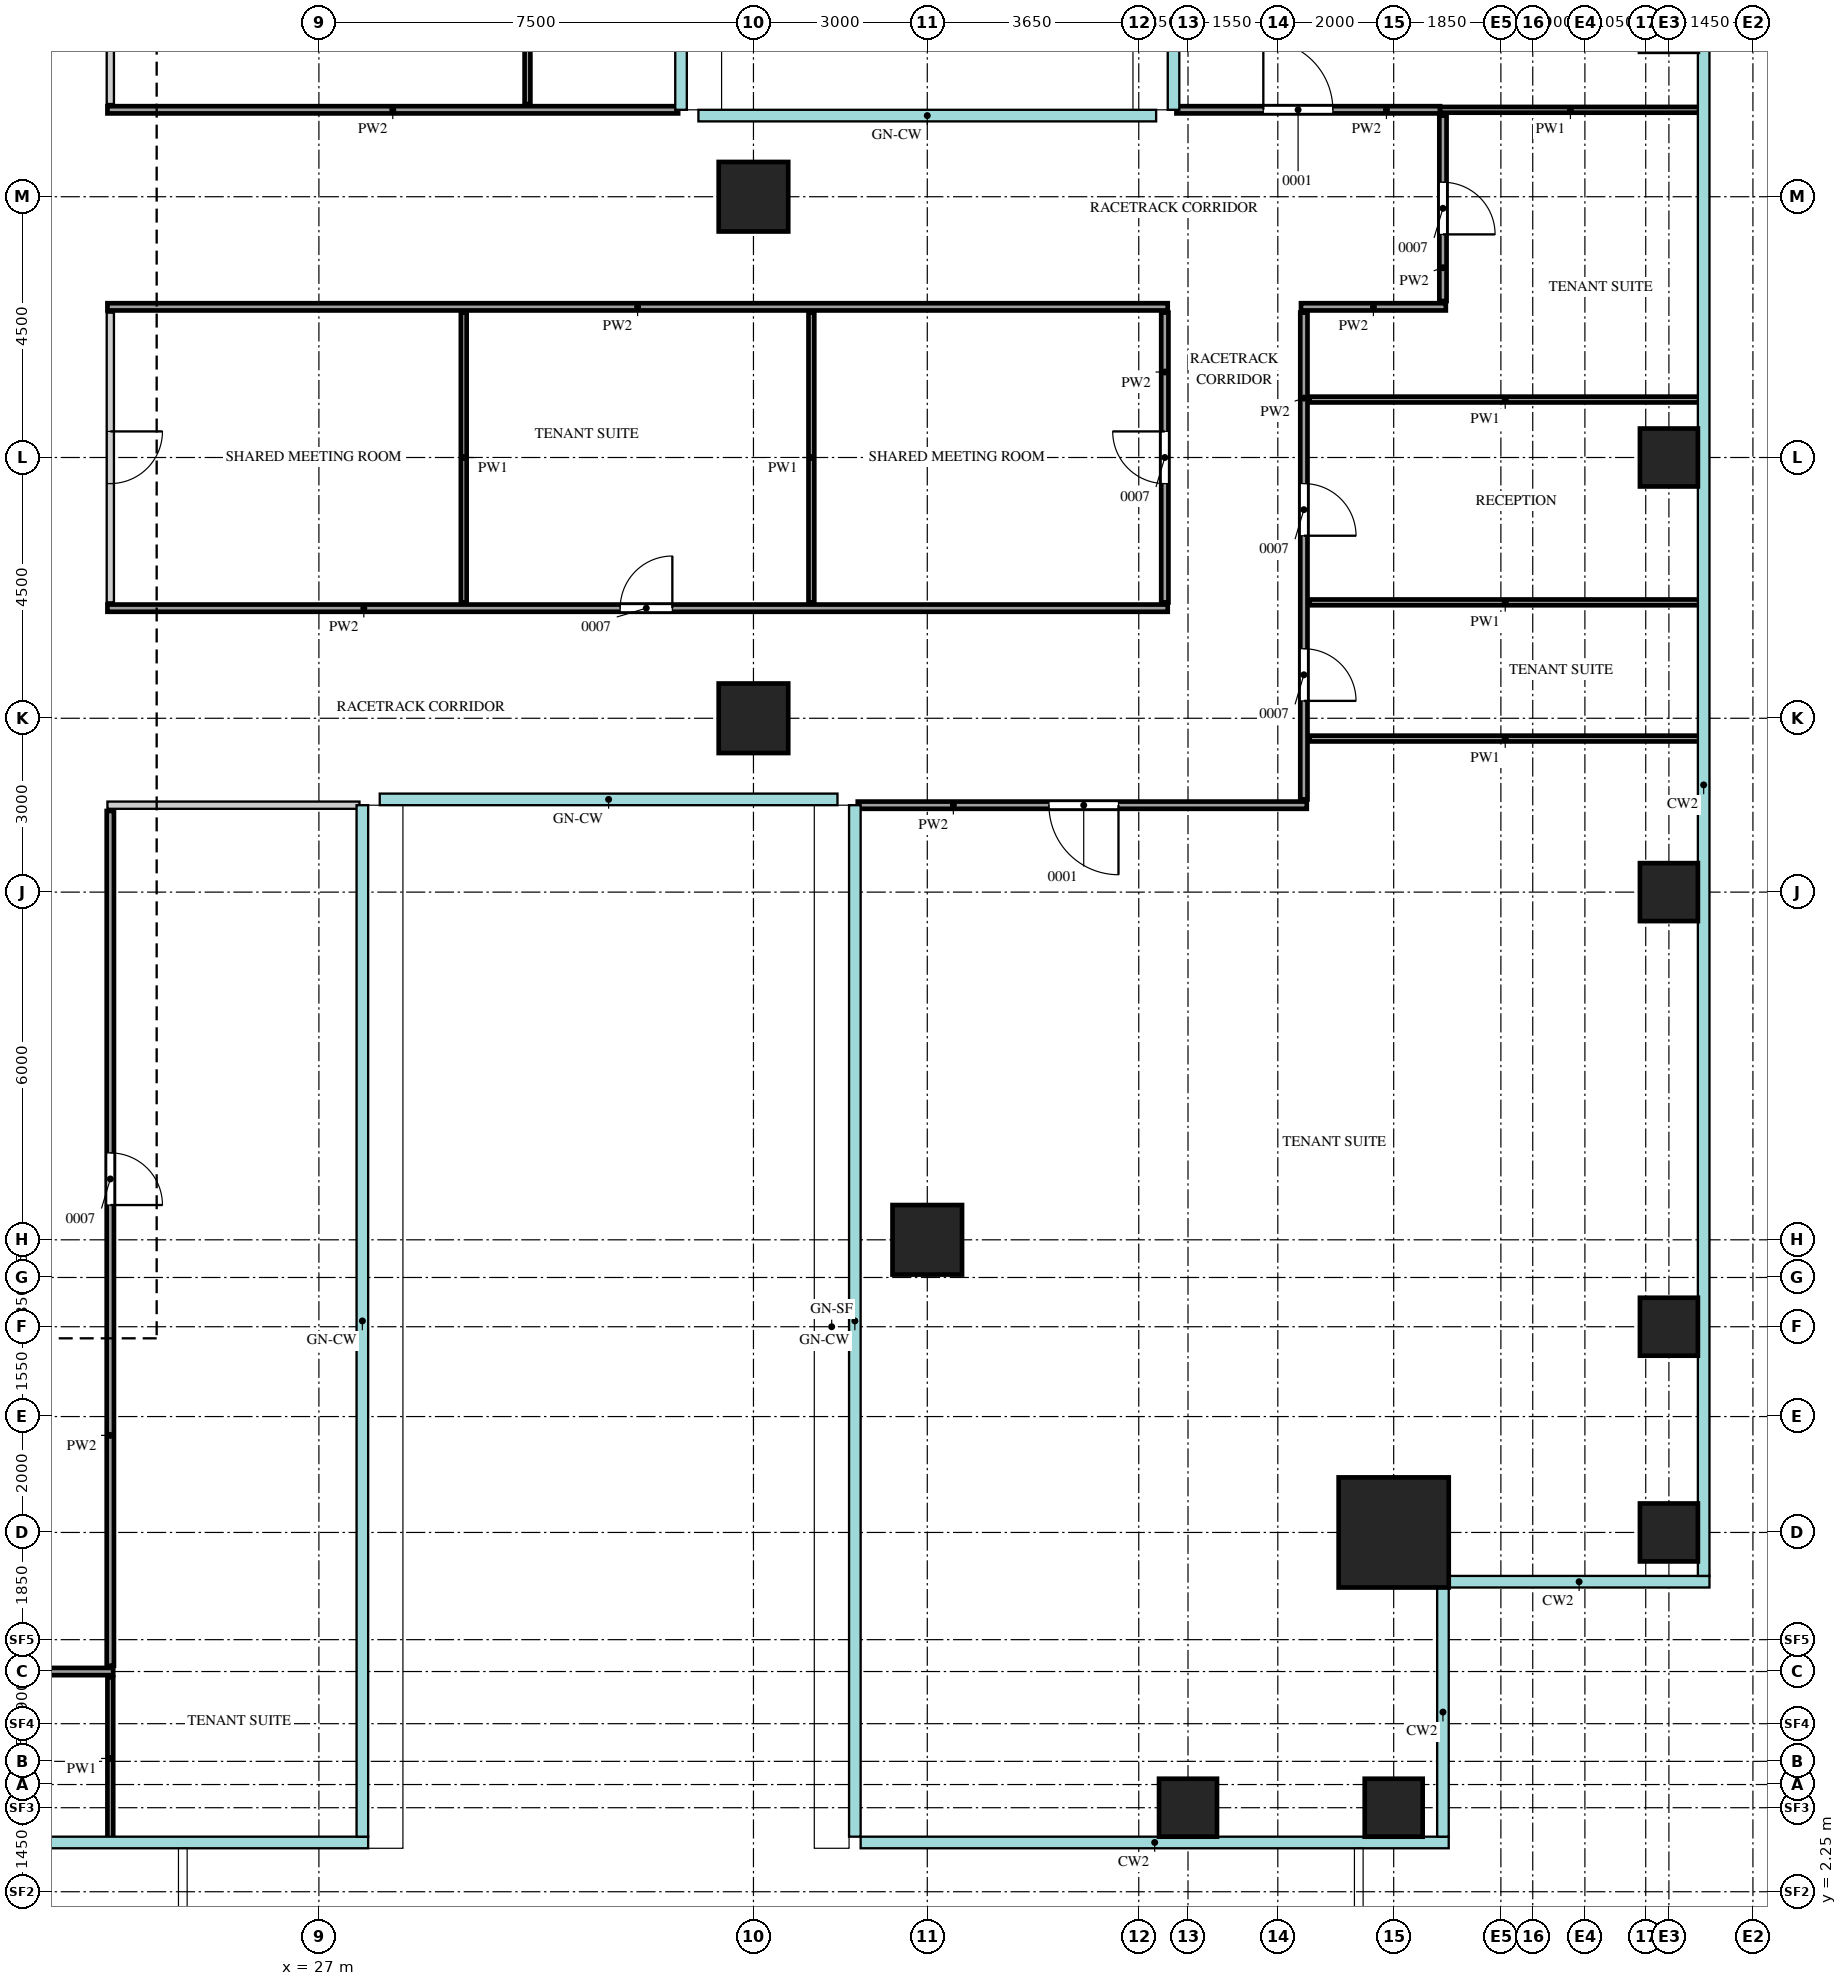
"""IFC4 building model, lengths in metres.
Left out: names, types, materials, properties, quantities, classifications, styles, units other than length and angle.
Written with IfcOpenShell. Run it as: python <this file> out.ifc"""

import sys

from ifc_helpers import new_model, si_unit, direction, frame, frame_2d, origin, origin_2d, place, context, subcontext, project, spatial, rectangle, extrude, source, transform, mapped, element, fill, save


model = new_model("IFC4")
c1 = context("Model", 3, precision=1e-05, world=origin(), true_north=direction((0.0, 1.0)))
c2 = subcontext(c1, "Body", "Model", "MODEL_VIEW")
j1 = project(units=[si_unit("LENGTHUNIT", "METRE"), si_unit("PLANEANGLEUNIT", "RADIAN")], contexts=[c1])
p1 = place(None, origin())
s1 = spatial("IfcSite", under=j1, at=p1, CompositionType="ELEMENT")
p2 = place(p1, origin())
s2 = spatial("IfcBuilding", under=s1, at=p2, CompositionType="ELEMENT")
p3 = place(p2, frame((0.0, 0.0, 180.7)))
s3 = spatial("IfcBuildingStorey", under=s2, at=p3, CompositionType="ELEMENT", Elevation=180.7)
m1 = source(origin(), c2, "Body", "SweptSolid", [
    extrude(rectangle(XDim=1.9, YDim=1.9, at=origin_2d()), origin(), (0.0, 0.0, 1.0), 4.0),
])
p4 = place(p3, frame((45.55, 8.45, 0.0), z_axis=(0.0, 0.0, 1.0), x_axis=(1.0, 0.0, 0.0)))
e1 = element("IfcColumn", 1, at=p4, inside=s3, PredefinedType="COLUMN", context=c2, shape_type="MappedRepresentation", body=[
    mapped(m1, transform((0.0, 0.0, 0.0))),
])
m2 = source(origin(), c2, "Body", "SweptSolid", [
    extrude(rectangle(XDim=1.0, YDim=1.0, at=origin_2d()), origin(), (0.0, 0.0, 1.0), 3.75),
])
for number, where, z_axis, x_axis in (
    (2, (42.0, 3.7, 0.0), (0.0, 0.0, 1.0), (1.0, 0.0, 0.0)),
    (3, (45.55, 3.7, 0.0), (0.0, 0.0, 1.0), (1.0, 0.0, 0.0)),
    (4, (50.3, 8.45, 0.0), (0.0, 0.0, 1.0), (1.0, 0.0, 0.0)),
    (5, (50.3, 12.0, 0.0), (0.0, 0.0, 1.0), (1.0, 0.0, 0.0)),
    (6, (50.3, 19.5, 0.0), (0.0, 0.0, 1.0), (1.0, 0.0, 0.0)),
    (7, (50.3, 27.0, 0.0), (0.0, 0.0, 1.0), (1.0, 0.0, 0.0)),
):
    element("IfcColumn", number, at=place(p3, frame(where, z_axis=z_axis, x_axis=x_axis)), inside=s3, PredefinedType="COLUMN", context=c2, shape_type="MappedRepresentation", body=[
        mapped(m2, transform((0.0, 0.0, 0.0))),
    ])
m3 = source(origin(), c2, "Body", "SweptSolid", [
    extrude(rectangle(XDim=1.2, YDim=1.2, at=origin_2d()), origin(), (0.0, 0.0, 1.0), 3.75),
])
for number, where, z_axis, x_axis in (
    (8, (37.5, 13.5, 0.0), (0.0, 0.0, 1.0), (1.0, 0.0, 0.0)),
    (9, (34.5, 22.5, 0.0), (0.0, 0.0, 1.0), (1.0, 0.0, 0.0)),
    (10, (34.5, 31.5, 0.0), (0.0, 0.0, 1.0), (1.0, 0.0, 0.0)),
):
    element("IfcColumn", number, at=place(p3, frame(where, z_axis=z_axis, x_axis=x_axis)), inside=s3, PredefinedType="COLUMN", context=c2, shape_type="MappedRepresentation", body=[
        mapped(m3, transform((0.0, 0.0, 0.0))),
    ])
m4 = source(origin(), c2, "Body", "SweptSolid", [
    extrude(rectangle(XDim=2.8, YDim=0.1, at=frame_2d((1.4, 0.0))), origin(), (0.0, 0.0, 1.0), 3.8),
])
p5 = place(p3, frame((23.4, 3.15, 0.0), z_axis=(0.0, 0.0, 1.0), x_axis=(0.0, 1.0, 0.0)))
e11 = element("IfcWall", 11, at=p5, inside=s3, PredefinedType="PARTITIONING", context=c2, shape_type="MappedRepresentation", body=[
    mapped(m4, transform((0.0, 0.0, 0.0))),
])
m5 = source(origin(), c2, "Body", "SweptSolid", [
    extrude(rectangle(XDim=15.8, YDim=0.125, at=frame_2d((7.9, 0.0))), origin(), (0.0, 0.0, 1.0), 3.8),
])
p6 = place(p3, frame((7.65, 6.05, 0.0), z_axis=(0.0, 0.0, 1.0), x_axis=(1.0, 0.0, 0.0)))
e12 = element("IfcWall", 12, at=p6, inside=s3, PredefinedType="PARTITIONING", context=c2, shape_type="MappedRepresentation", body=[
    mapped(m5, transform((0.0, 0.0, 0.0))),
])
m6 = source(origin(), c2, "Body", "SweptSolid", [
    extrude(rectangle(XDim=0.9, YDim=2.1, at=frame_2d((0.45, 1.05))), frame((0.0, 0.073, 0.0), z_axis=(0.0, -1.0, 0.0), x_axis=(1.0, 0.0, 0.0)), (0.0, 0.0, 1.0), 0.145),
])
p7 = place(p6, frame((1.8, 0.0, 0.0)))
e13 = element("IfcOpeningElement", 13, at=p7, cuts=e12, PredefinedType="OPENING", context=c2, shape_type="MappedRepresentation", body=[
    mapped(m6, transform((0.0, 0.0, 0.0))),
])
p8 = place(p6, frame((8.85, 0.0, 0.0)))
e14 = element("IfcOpeningElement", 14, at=p8, cuts=e12, PredefinedType="OPENING", context=c2, shape_type="MappedRepresentation", body=[
    mapped(m6, transform((0.0, 0.0, 0.0))),
])
m7 = source(origin(), c2, "Body", "SweptSolid", [
    extrude(rectangle(XDim=14.75, YDim=0.125, at=frame_2d((7.375, 0.0))), origin(), (0.0, 0.0, 1.0), 3.8),
])
p9 = place(p3, frame((23.4, 6.15, 0.0), z_axis=(0.0, 0.0, 1.0), x_axis=(0.0, 1.0, 0.0)))
e15 = element("IfcWall", 15, at=p9, inside=s3, PredefinedType="PARTITIONING", context=c2, shape_type="MappedRepresentation", body=[
    mapped(m7, transform((0.0, 0.0, 0.0))),
])
p10 = place(p9, frame((7.95, 0.0, 0.0)))
e16 = element("IfcOpeningElement", 16, at=p10, cuts=e15, PredefinedType="OPENING", context=c2, shape_type="MappedRepresentation", body=[
    mapped(m6, transform((0.0, 0.0, 0.0))),
])
m8 = source(origin(), c2, "Body", "SweptSolid", [
    extrude(rectangle(XDim=4.35, YDim=0.125, at=frame_2d((2.175, 0.0))), origin(), (0.0, 0.0, 1.0), 3.8),
])
p11 = place(p3, frame((23.35, 21.0, 0.0), z_axis=(0.0, 0.0, 1.0), x_axis=(1.0, 0.0, 0.0)))
e17 = element("IfcWall", 17, at=p11, inside=s3, PredefinedType="PARTITIONING", context=c2, shape_type="MappedRepresentation", body=[
    mapped(m8, transform((0.0, 0.0, 0.0))),
])
m9 = source(origin(), c2, "Body", "SweptSolid", [
    extrude(rectangle(XDim=7.75, YDim=0.125, at=frame_2d((3.875, 0.0))), origin(), (0.0, 0.0, 1.0), 3.8),
])
p12 = place(p3, frame((36.3, 21.0, 0.0), z_axis=(0.0, 0.0, 1.0), x_axis=(1.0, 0.0, 0.0)))
e18 = element("IfcWall", 18, at=p12, inside=s3, PredefinedType="PARTITIONING", context=c2, shape_type="MappedRepresentation", body=[
    mapped(m9, transform((0.0, 0.0, 0.0))),
])
m10 = source(origin(), c2, "Body", "SweptSolid", [
    extrude(rectangle(XDim=1.2, YDim=2.1, at=frame_2d((0.6, 1.05))), frame((0.0, 0.073, 0.0), z_axis=(0.0, -1.0, 0.0), x_axis=(1.0, 0.0, 0.0)), (0.0, 0.0, 1.0), 0.145),
])
p13 = place(p12, frame((3.3, 0.0, 0.0)))
e19 = element("IfcOpeningElement", 19, at=p13, cuts=e18, PredefinedType="OPENING", context=c2, shape_type="MappedRepresentation", body=[
    mapped(m10, transform((0.0, 0.0, 0.0))),
])
m11 = source(origin(), c2, "Body", "SweptSolid", [
    extrude(rectangle(XDim=8.4, YDim=0.125, at=frame_2d((4.2, 0.0))), origin(), (0.0, 0.0, 1.0), 3.8),
])
p14 = place(p3, frame((44.0, 21.1, 0.0), z_axis=(0.0, 0.0, 1.0), x_axis=(0.0, 1.0, 0.0)))
e20 = element("IfcWall", 20, at=p14, inside=s3, PredefinedType="PARTITIONING", context=c2, shape_type="MappedRepresentation", body=[
    mapped(m11, transform((0.0, 0.0, 0.0))),
])
p15 = place(p14, frame((1.7, 0.0, 0.0)))
e21 = element("IfcOpeningElement", 21, at=p15, cuts=e20, PredefinedType="OPENING", context=c2, shape_type="MappedRepresentation", body=[
    mapped(m6, transform((0.0, 0.0, 0.0))),
])
p16 = place(p14, frame((4.55, 0.0, 0.0)))
e22 = element("IfcOpeningElement", 22, at=p16, cuts=e20, PredefinedType="OPENING", context=c2, shape_type="MappedRepresentation", body=[
    mapped(m6, transform((0.0, 0.0, 0.0))),
])
m12 = source(origin(), c2, "Body", "SweptSolid", [
    extrude(rectangle(XDim=6.75, YDim=0.1, at=frame_2d((3.375, 0.0))), origin(), (0.0, 0.0, 1.0), 3.8),
])
p17 = place(p3, frame((44.1, 22.15, 0.0), z_axis=(0.0, 0.0, 1.0), x_axis=(1.0, 0.0, 0.0)))
e23 = element("IfcWall", 23, at=p17, inside=s3, PredefinedType="PARTITIONING", context=c2, shape_type="MappedRepresentation", body=[
    mapped(m12, transform((0.0, 0.0, 0.0))),
])
m13 = source(origin(), c2, "Body", "SweptSolid", [
    extrude(rectangle(XDim=18.3, YDim=0.125, at=frame_2d((9.15, 0.0))), origin(), (0.0, 0.0, 1.0), 3.8),
])
p18 = place(p3, frame((23.35, 24.4, 0.0), z_axis=(0.0, 0.0, 1.0), x_axis=(1.0, 0.0, 0.0)))
e24 = element("IfcWall", 24, at=p18, inside=s3, PredefinedType="PARTITIONING", context=c2, shape_type="MappedRepresentation", body=[
    mapped(m13, transform((0.0, 0.0, 0.0))),
])
p19 = place(p18, frame((8.85, 0.0, 0.0)))
e25 = element("IfcOpeningElement", 25, at=p19, cuts=e24, PredefinedType="OPENING", context=c2, shape_type="MappedRepresentation", body=[
    mapped(m6, transform((0.0, 0.0, 0.0))),
])
m14 = source(origin(), c2, "Body", "SweptSolid", [
    extrude(rectangle(XDim=5.0, YDim=0.125, at=frame_2d((2.5, 0.0))), origin(), (0.0, 0.0, 1.0), 3.8),
])
p20 = place(p3, frame((23.4, 24.5, 0.0), z_axis=(0.0, 0.0, 1.0), x_axis=(0.0, 1.0, 0.0)))
e26 = element("IfcWall", 26, at=p20, inside=s3, PredefinedType="PARTITIONING", context=c2, shape_type="MappedRepresentation", body=[
    mapped(m14, transform((0.0, 0.0, 0.0))),
])
p21 = place(p20, frame((2.05, 0.0, 0.0)))
e27 = element("IfcOpeningElement", 27, at=p21, cuts=e26, PredefinedType="OPENING", context=c2, shape_type="MappedRepresentation", body=[
    mapped(m6, transform((0.0, 0.0, 0.0))),
])
m15 = source(origin(), c2, "Body", "SweptSolid", [
    extrude(rectangle(XDim=5.0, YDim=0.1, at=frame_2d((2.5, 0.0))), origin(), (0.0, 0.0, 1.0), 3.8),
])
for number, where, z_axis, x_axis in (
    (28, (29.5, 24.5, 0.0), (0.0, 0.0, 1.0), (0.0, 1.0, 0.0)),
    (29, (35.5, 24.5, 0.0), (0.0, 0.0, 1.0), (0.0, 1.0, 0.0)),
):
    element("IfcWall", number, at=place(p3, frame(where, z_axis=z_axis, x_axis=x_axis)), inside=s3, PredefinedType="PARTITIONING", context=c2, shape_type="MappedRepresentation", body=[
        mapped(m15, transform((0.0, 0.0, 0.0))),
    ])
p22 = place(p3, frame((41.6, 24.5, 0.0), z_axis=(0.0, 0.0, 1.0), x_axis=(0.0, 1.0, 0.0)))
e30 = element("IfcWall", 30, at=p22, inside=s3, PredefinedType="PARTITIONING", context=c2, shape_type="MappedRepresentation", body=[
    mapped(m14, transform((0.0, 0.0, 0.0))),
])
p23 = place(p22, frame((2.05, 0.0, 0.0)))
e31 = element("IfcOpeningElement", 31, at=p23, cuts=e30, PredefinedType="OPENING", context=c2, shape_type="MappedRepresentation", body=[
    mapped(m6, transform((0.0, 0.0, 0.0))),
])
for number, where, z_axis, x_axis in (
    (32, (44.1, 24.5, 0.0), (0.0, 0.0, 1.0), (1.0, 0.0, 0.0)),
    (33, (44.1, 28.0, 0.0), (0.0, 0.0, 1.0), (1.0, 0.0, 0.0)),
):
    element("IfcWall", number, at=place(p3, frame(where, z_axis=z_axis, x_axis=x_axis)), inside=s3, PredefinedType="PARTITIONING", context=c2, shape_type="MappedRepresentation", body=[
        mapped(m12, transform((0.0, 0.0, 0.0))),
    ])
p24 = place(p3, frame((23.35, 29.6, 0.0), z_axis=(0.0, 0.0, 1.0), x_axis=(1.0, 0.0, 0.0)))
e34 = element("IfcWall", 34, at=p24, inside=s3, PredefinedType="PARTITIONING", context=c2, shape_type="MappedRepresentation", body=[
    mapped(m13, transform((0.0, 0.0, 0.0))),
])
m16 = source(origin(), c2, "Body", "SweptSolid", [
    extrude(rectangle(XDim=2.5, YDim=0.125, at=frame_2d((1.25, 0.0))), origin(), (0.0, 0.0, 1.0), 3.8),
])
p25 = place(p3, frame((43.95, 29.6, 0.0), z_axis=(0.0, 0.0, 1.0), x_axis=(1.0, 0.0, 0.0)))
e35 = element("IfcWall", 35, at=p25, inside=s3, PredefinedType="PARTITIONING", context=c2, shape_type="MappedRepresentation", body=[
    mapped(m16, transform((0.0, 0.0, 0.0))),
])
m17 = source(origin(), c2, "Body", "SweptSolid", [
    extrude(rectangle(XDim=3.2, YDim=0.125, at=frame_2d((1.6, 0.0))), origin(), (0.0, 0.0, 1.0), 3.8),
])
p26 = place(p3, frame((46.4, 29.7, 0.0), z_axis=(0.0, 0.0, 1.0), x_axis=(0.0, 1.0, 0.0)))
e36 = element("IfcWall", 36, at=p26, inside=s3, PredefinedType="PARTITIONING", context=c2, shape_type="MappedRepresentation", body=[
    mapped(m17, transform((0.0, 0.0, 0.0))),
])
p27 = place(p26, frame((1.15, 0.0, 0.0)))
e37 = element("IfcOpeningElement", 37, at=p27, cuts=e36, PredefinedType="OPENING", context=c2, shape_type="MappedRepresentation", body=[
    mapped(m6, transform((0.0, 0.0, 0.0))),
])
m18 = source(origin(), c2, "Body", "SweptSolid", [
    extrude(rectangle(XDim=9.85, YDim=0.125, at=frame_2d((4.925, 0.0))), origin(), (0.0, 0.0, 1.0), 3.8),
])
p28 = place(p3, frame((23.35, 33.0, 0.0), z_axis=(0.0, 0.0, 1.0), x_axis=(1.0, 0.0, 0.0)))
e38 = element("IfcWall", 38, at=p28, inside=s3, PredefinedType="PARTITIONING", context=c2, shape_type="MappedRepresentation", body=[
    mapped(m18, transform((0.0, 0.0, 0.0))),
])
m19 = source(origin(), c2, "Body", "SweptSolid", [
    extrude(rectangle(XDim=4.55, YDim=0.125, at=frame_2d((2.275, 0.0))), origin(), (0.0, 0.0, 1.0), 3.8),
])
p29 = place(p3, frame((41.8, 33.0, 0.0), z_axis=(0.0, 0.0, 1.0), x_axis=(1.0, 0.0, 0.0)))
e39 = element("IfcWall", 39, at=p29, inside=s3, PredefinedType="PARTITIONING", context=c2, shape_type="MappedRepresentation", body=[
    mapped(m19, transform((0.0, 0.0, 0.0))),
])
p30 = place(p29, frame((1.5, 0.0, 0.0)))
e40 = element("IfcOpeningElement", 40, at=p30, cuts=e39, PredefinedType="OPENING", context=c2, shape_type="MappedRepresentation", body=[
    mapped(m10, transform((0.0, 0.0, 0.0))),
])
m20 = source(origin(), c2, "Body", "SweptSolid", [
    extrude(rectangle(XDim=4.5, YDim=0.1, at=frame_2d((2.25, 0.0))), origin(), (0.0, 0.0, 1.0), 3.8),
])
p31 = place(p3, frame((46.35, 33.0, 0.0), z_axis=(0.0, 0.0, 1.0), x_axis=(1.0, 0.0, 0.0)))
e41 = element("IfcWall", 41, at=p31, inside=s3, PredefinedType="PARTITIONING", context=c2, shape_type="MappedRepresentation", body=[
    mapped(m20, transform((0.0, 0.0, 0.0))),
])
m21 = source(origin(), c2, "Body", "SweptSolid", [
    extrude(rectangle(XDim=6.3, YDim=0.125, at=frame_2d((3.15, 0.0))), origin(), (0.0, 0.0, 1.0), 3.8),
])
p32 = place(p3, frame((23.4, 33.1, 0.0), z_axis=(0.0, 0.0, 1.0), x_axis=(0.0, 1.0, 0.0)))
e42 = element("IfcWall", 42, at=p32, inside=s3, PredefinedType="PARTITIONING", context=c2, shape_type="MappedRepresentation", body=[
    mapped(m21, transform((0.0, 0.0, 0.0))),
])
m22 = source(origin(), c2, "Body", "SweptSolid", [
    extrude(rectangle(XDim=6.3, YDim=0.1, at=frame_2d((3.15, 0.0))), origin(), (0.0, 0.0, 1.0), 3.8),
])
p33 = place(p3, frame((30.6, 33.1, 0.0), z_axis=(0.0, 0.0, 1.0), x_axis=(0.0, 1.0, 0.0)))
e43 = element("IfcWall", 43, at=p33, inside=s3, PredefinedType="PARTITIONING", context=c2, shape_type="MappedRepresentation", body=[
    mapped(m22, transform((0.0, 0.0, 0.0))),
])
m23 = source(origin(), c2, "Body", "SweptSolid", [
    extrude(rectangle(XDim=0.9, YDim=2.1, at=frame_2d((0.45, 1.05))), frame((0.0, 0.025, 0.0), z_axis=(0.0, -1.0, 0.0), x_axis=(1.0, 0.0, 0.0)), (0.0, 0.0, 1.0), 0.05),
])
p34 = place(p10, origin())
e44 = element("IfcDoor", 44, at=p34, inside=s3, OperationType="SINGLE_SWING_LEFT", PredefinedType="DOOR", context=c2, shape_type="MappedRepresentation", body=[
    mapped(m23, transform((0.0, 0.0, 0.0))),
])
fill(e16, e44)
m24 = source(origin(), c2, "Body", "SweptSolid", [
    extrude(rectangle(XDim=1.2, YDim=2.1, at=frame_2d((0.6, 1.05))), frame((0.0, 0.025, 0.0), z_axis=(0.0, -1.0, 0.0), x_axis=(1.0, 0.0, 0.0)), (0.0, 0.0, 1.0), 0.05),
])
p35 = place(p13, origin())
e45 = element("IfcDoor", 45, at=p35, inside=s3, OperationType="SINGLE_SWING_RIGHT", PredefinedType="DOOR", context=c2, shape_type="MappedRepresentation", body=[
    mapped(m24, transform((0.0, 0.0, 0.0))),
])
fill(e19, e45)
p36 = place(p30, origin())
e46 = element("IfcDoor", 46, at=p36, inside=s3, OperationType="SINGLE_SWING_RIGHT", PredefinedType="DOOR", context=c2, shape_type="MappedRepresentation", body=[
    mapped(m24, transform((0.0, 0.0, 0.0))),
])
fill(e40, e46)
p37 = place(p15, origin())
e47 = element("IfcDoor", 47, at=p37, inside=s3, OperationType="SINGLE_SWING_LEFT", PredefinedType="DOOR", context=c2, shape_type="MappedRepresentation", body=[
    mapped(m23, transform((0.0, 0.0, 0.0))),
])
fill(e21, e47)
p38 = place(p16, origin())
e48 = element("IfcDoor", 48, at=p38, inside=s3, OperationType="SINGLE_SWING_LEFT", PredefinedType="DOOR", context=c2, shape_type="MappedRepresentation", body=[
    mapped(m23, transform((0.0, 0.0, 0.0))),
])
fill(e22, e48)
p39 = place(p27, origin())
e49 = element("IfcDoor", 49, at=p39, inside=s3, OperationType="SINGLE_SWING_LEFT", PredefinedType="DOOR", context=c2, shape_type="MappedRepresentation", body=[
    mapped(m23, transform((0.0, 0.0, 0.0))),
])
fill(e37, e49)
p40 = place(p21, origin())
e50 = element("IfcDoor", 50, at=p40, inside=s3, OperationType="SINGLE_SWING_RIGHT", PredefinedType="DOOR", context=c2, shape_type="MappedRepresentation", body=[
    mapped(m23, transform((0.0, 0.0, 0.0))),
])
fill(e27, e50)
p41 = place(p19, origin())
e51 = element("IfcDoor", 51, at=p41, inside=s3, OperationType="SINGLE_SWING_LEFT", PredefinedType="DOOR", context=c2, shape_type="MappedRepresentation", body=[
    mapped(m23, transform((0.0, 0.0, 0.0))),
])
fill(e25, e51)
p42 = place(p23, origin())
e52 = element("IfcDoor", 52, at=p42, inside=s3, OperationType="SINGLE_SWING_LEFT", PredefinedType="DOOR", context=c2, shape_type="MappedRepresentation", body=[
    mapped(m23, transform((0.0, 0.0, 0.0))),
])
fill(e31, e52)
save(model, sys.argv[1])
